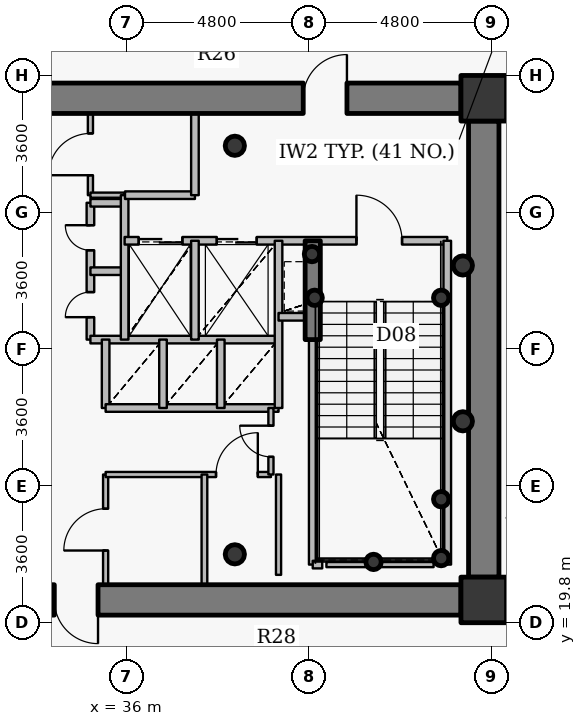
"""IFC4 building model, lengths in metres.
Left out: names, types, materials, properties, quantities, classifications, styles, units other than length and angle.
Written with IfcOpenShell. Run it as: python <this file> out.ifc"""

import sys

from ifc_helpers import new_model, si_unit, direction, frame, frame_2d, origin, origin_2d, place, context, subcontext, project, spatial, rectangle, hollow_circle, extrude, source, transform, mapped, element, fill, save


model = new_model("IFC4")
c1 = context("Model", 3, precision=1e-05, world=origin(), true_north=direction((0.0, 1.0)))
c2 = subcontext(c1, "Body", "Model", "MODEL_VIEW")
j1 = project(units=[si_unit("LENGTHUNIT", "METRE"), si_unit("PLANEANGLEUNIT", "RADIAN")], contexts=[c1])
p1 = place(None, origin())
s1 = spatial("IfcSite", under=j1, at=p1, CompositionType="ELEMENT")
p2 = place(p1, origin())
s2 = spatial("IfcBuilding", under=s1, at=p2, CompositionType="ELEMENT")
p3 = place(p2, frame((0.0, 0.0, 178.65)))
s3 = spatial("IfcBuildingStorey", under=s2, at=p3, CompositionType="ELEMENT", Elevation=178.65)
for number, where, z_axis, x_axis in (
    (1, (45.4, 20.4, 0.0), (0.0, 0.0, 1.0), (1.0, 0.0, 0.0)),
    (2, (45.4, 33.6, 0.0), (0.0, 0.0, 1.0), (1.0, 0.0, 0.0)),
):
    element("IfcColumn", number, at=place(p3, frame(where, z_axis=z_axis, x_axis=x_axis)), inside=s3, PredefinedType="COLUMN", context=c2, shape_type="SweptSolid", body=[
        extrude(rectangle(XDim=1.2, YDim=1.2, at=origin_2d()), origin(), (0.0, 0.0, 1.0), 3.75),
    ])
for number, where, z_axis, x_axis in (
    (3, (38.85, 21.6, 0.0), (0.0, 0.0, 1.0), (1.0, 0.0, 0.0)),
    (4, (38.85, 32.35, 0.0), (0.0, 0.0, 1.0), (1.0, 0.0, 0.0)),
):
    element("IfcColumn", number, at=place(p3, frame(where, z_axis=z_axis, x_axis=x_axis)), inside=s3, PredefinedType="COLUMN", context=c2, shape_type="SweptSolid", body=[
        extrude(hollow_circle(Radius=0.254, WallThickness=0.02, at=origin_2d()), origin(), (0.0, 0.0, 1.0), 3.75),
    ])
for number, where, z_axis, x_axis in (
    (5, (44.28, 21.5, 0.0), (0.0, 0.0, 1.0), (1.0, 0.0, 0.0)),
    (6, (44.28, 23.05, 0.0), (0.0, 0.0, 1.0), (1.0, 0.0, 0.0)),
    (7, (42.5, 21.4, 0.0), (0.0, 0.0, 1.0), (1.0, 0.0, 0.0)),
    (8, (40.95, 28.35, 0.0), (0.0, 0.0, 1.0), (1.0, 0.0, 0.0)),
    (9, (44.28, 28.35, 0.0), (0.0, 0.0, 1.0), (1.0, 0.0, 0.0)),
    (10, (40.88, 29.5, 0.0), (0.0, 0.0, 1.0), (1.0, 0.0, 0.0)),
):
    element("IfcColumn", number, at=place(p3, frame(where, z_axis=z_axis, x_axis=x_axis)), inside=s3, PredefinedType="COLUMN", context=c2, shape_type="SweptSolid", body=[
        extrude(hollow_circle(Radius=0.203, WallThickness=0.016, at=origin_2d()), origin(), (0.0, 0.0, 1.0), 3.75),
    ])
p4 = place(p3, frame((27.2, 33.6, 0.0), z_axis=(0.0, 0.0, 1.0), x_axis=(1.0, 0.0, 0.0)))
e11 = element("IfcWall", 11, at=p4, inside=s3, PredefinedType="SHEAR", context=c2, shape_type="SweptSolid", body=[
    extrude(rectangle(XDim=17.6, YDim=0.8, at=frame_2d((8.8, 0.0))), origin(), (0.0, 0.0, 1.0), 2.95),
])
p5 = place(p4, frame((13.45, 0.0, 0.0)))
e12 = element("IfcOpeningElement", 12, at=p5, cuts=e11, PredefinedType="OPENING", context=c2, shape_type="SweptSolid", body=[
    extrude(rectangle(XDim=1.15, YDim=2.15, at=origin_2d()), frame((0.575, 0.41, 1.075), z_axis=(0.0, -1.0, 0.0), x_axis=(1.0, 0.0, 0.0)), (0.0, 0.0, 1.0), 0.82),
])
p6 = place(p3, frame((45.4, 33.0, 0.0), z_axis=(0.0, 0.0, 1.0), x_axis=(0.0, -1.0, 0.0)))
e13 = element("IfcWall", 13, at=p6, inside=s3, PredefinedType="SHEAR", context=c2, shape_type="SweptSolid", body=[
    extrude(rectangle(XDim=12.0, YDim=0.8, at=frame_2d((6.0, 0.0))), origin(), (0.0, 0.0, 1.0), 2.95),
])
p7 = place(p3, frame((44.8, 20.4, 0.0), z_axis=(0.0, 0.0, 1.0), x_axis=(-1.0, 0.0, 0.0)))
e14 = element("IfcWall", 14, at=p7, inside=s3, PredefinedType="SHEAR", context=c2, shape_type="SweptSolid", body=[
    extrude(rectangle(XDim=17.6, YDim=0.8, at=frame_2d((8.8, 0.0))), origin(), (0.0, 0.0, 1.0), 2.95),
])
p8 = place(p7, frame((9.55, 0.0, 0.0)))
e15 = element("IfcOpeningElement", 15, at=p8, cuts=e14, PredefinedType="OPENING", context=c2, shape_type="SweptSolid", body=[
    extrude(rectangle(XDim=1.15, YDim=2.15, at=origin_2d()), frame((0.575, 0.41, 1.075), z_axis=(0.0, -1.0, 0.0), x_axis=(1.0, 0.0, 0.0)), (0.0, 0.0, 1.0), 0.82),
])
p9 = place(p3, frame((40.9, 27.25, 0.0), z_axis=(0.0, 0.0, 1.0), x_axis=(0.0, 1.0, 0.0)))
e16 = element("IfcWall", 16, at=p9, inside=s3, PredefinedType="SHEAR", context=c2, shape_type="SweptSolid", body=[
    extrude(rectangle(XDim=2.6, YDim=0.4, at=frame_2d((1.3, 0.0))), origin(), (0.0, 0.0, 1.0), 3.1),
])
for number, where, z_axis, x_axis in (
    (17, (44.85, 25.1, 0.0), (0.0, 0.0, 1.0), (1.0, 0.0, 0.0)),
    (18, (44.85, 29.2, 0.0), (0.0, 0.0, 1.0), (1.0, 0.0, 0.0)),
):
    element("IfcColumn", number, at=place(p3, frame(where, z_axis=z_axis, x_axis=x_axis)), inside=s3, PredefinedType="COLUMN", context=c2, shape_type="SweptSolid", body=[
        extrude(hollow_circle(Radius=0.254, WallThickness=0.02, at=origin_2d()), origin(), (0.0, 0.0, 1.0), 3.75),
    ])
p10 = place(p3, frame((35.05, 27.25, 0.0), z_axis=(0.0, 0.0, 1.0), x_axis=(0.0, 1.0, 0.0)))
e19 = element("IfcWall", 19, at=p10, inside=s3, PredefinedType="PARTITIONING", context=c2, shape_type="SweptSolid", body=[
    extrude(rectangle(XDim=3.6, YDim=0.2, at=frame_2d((1.8, 0.0))), origin(), (0.0, 0.0, 1.0), 3.5),
])
p11 = place(p10, frame((0.59, 0.0, 0.0)))
e20 = element("IfcOpeningElement", 20, at=p11, cuts=e19, PredefinedType="OPENING", context=c2, shape_type="SweptSolid", body=[
    extrude(rectangle(XDim=0.66, YDim=2.05, at=origin_2d()), frame((0.33, 0.11, 1.025), z_axis=(0.0, -1.0, 0.0), x_axis=(1.0, 0.0, 0.0)), (0.0, 0.0, 1.0), 0.22),
])
p12 = place(p10, frame((2.35, 0.0, 0.0)))
e21 = element("IfcOpeningElement", 21, at=p12, cuts=e19, PredefinedType="OPENING", context=c2, shape_type="SweptSolid", body=[
    extrude(rectangle(XDim=0.66, YDim=2.05, at=origin_2d()), frame((0.33, 0.11, 1.025), z_axis=(0.0, -1.0, 0.0), x_axis=(1.0, 0.0, 0.0)), (0.0, 0.0, 1.0), 0.22),
])
p13 = place(p3, frame((35.05, 27.25, 0.0), z_axis=(0.0, 0.0, 1.0), x_axis=(1.0, 0.0, 0.0)))
e22 = element("IfcWall", 22, at=p13, inside=s3, PredefinedType="PARTITIONING", context=c2, shape_type="SweptSolid", body=[
    extrude(rectangle(XDim=4.95, YDim=0.2, at=frame_2d((2.475, 0.0))), origin(), (0.0, 0.0, 1.0), 3.085),
])
for number, where, z_axis, x_axis in (
    (23, (35.05, 29.05, 0.0), (0.0, 0.0, 1.0), (1.0, 0.0, 0.0)),
    (24, (35.05, 30.85, 0.0), (0.0, 0.0, 1.0), (1.0, 0.0, 0.0)),
):
    element("IfcWall", number, at=place(p3, frame(where, z_axis=z_axis, x_axis=x_axis)), inside=s3, PredefinedType="PARTITIONING", context=c2, shape_type="SweptSolid", body=[
        extrude(rectangle(XDim=0.9, YDim=0.2, at=frame_2d((0.45, 0.0))), origin(), (0.0, 0.0, 1.0), 3.5),
    ])
p14 = place(p3, frame((35.05, 31.05, 0.0), z_axis=(0.0, 0.0, 1.0), x_axis=(0.0, 1.0, 0.0)))
e25 = element("IfcWall", 25, at=p14, inside=s3, PredefinedType="PARTITIONING", context=c2, shape_type="SweptSolid", body=[
    extrude(rectangle(XDim=2.15, YDim=0.135, at=frame_2d((1.075, 0.0))), origin(), (0.0, 0.0, 1.0), 3.085),
])
p15 = place(p14, frame((0.525, 0.0, 0.0)))
e26 = element("IfcOpeningElement", 26, at=p15, cuts=e25, PredefinedType="OPENING", context=c2, shape_type="SweptSolid", body=[
    extrude(rectangle(XDim=1.1, YDim=2.15, at=origin_2d()), frame((0.55, 0.078, 1.075), z_axis=(0.0, -1.0, 0.0), x_axis=(1.0, 0.0, 0.0)), (0.0, 0.0, 1.0), 0.155),
])
p16 = place(p3, frame((35.05, 31.05, 0.0), z_axis=(0.0, 0.0, 1.0), x_axis=(1.0, 0.0, 0.0)))
e27 = element("IfcWall", 27, at=p16, inside=s3, PredefinedType="PARTITIONING", context=c2, shape_type="SweptSolid", body=[
    extrude(rectangle(XDim=0.9, YDim=0.135, at=frame_2d((0.45, 0.0))), origin(), (0.0, 0.0, 1.0), 3.5),
])
p17 = place(p3, frame((35.45, 20.8, 0.0), z_axis=(0.0, 0.0, 1.0), x_axis=(0.0, 1.0, 0.0)))
e28 = element("IfcWall", 28, at=p17, inside=s3, PredefinedType="PARTITIONING", context=c2, shape_type="SweptSolid", body=[
    extrude(rectangle(XDim=2.9, YDim=0.135, at=frame_2d((1.45, 0.0))), origin(), (0.0, 0.0, 1.0), 3.085),
])
p18 = place(p17, frame((0.9, 0.0, 0.0)))
e29 = element("IfcOpeningElement", 29, at=p18, cuts=e28, PredefinedType="OPENING", context=c2, shape_type="SweptSolid", body=[
    extrude(rectangle(XDim=1.1, YDim=2.15, at=origin_2d()), frame((0.55, 0.078, 1.075), z_axis=(0.0, -1.0, 0.0), x_axis=(1.0, 0.0, 0.0)), (0.0, 0.0, 1.0), 0.155),
])
p19 = place(p3, frame((35.45, 23.7, 0.0), z_axis=(0.0, 0.0, 1.0), x_axis=(1.0, 0.0, 0.0)))
e30 = element("IfcWall", 30, at=p19, inside=s3, PredefinedType="PARTITIONING", context=c2, shape_type="SweptSolid", body=[
    extrude(rectangle(XDim=4.35, YDim=0.135, at=frame_2d((2.175, 0.0))), origin(), (0.0, 0.0, 1.0), 3.085),
])
p20 = place(p19, frame((2.905, 0.0, 0.0)))
e31 = element("IfcOpeningElement", 31, at=p20, cuts=e30, PredefinedType="OPENING", context=c2, shape_type="SweptSolid", body=[
    extrude(rectangle(XDim=1.1, YDim=2.15, at=origin_2d()), frame((0.55, 0.078, 1.075), z_axis=(0.0, -1.0, 0.0), x_axis=(1.0, 0.0, 0.0)), (0.0, 0.0, 1.0), 0.155),
])
p21 = place(p3, frame((35.45, 25.45, 0.0), z_axis=(0.0, 0.0, 1.0), x_axis=(0.0, 1.0, 0.0)))
e32 = element("IfcWall", 32, at=p21, inside=s3, PredefinedType="PARTITIONING", context=c2, shape_type="SweptSolid", body=[
    extrude(rectangle(XDim=1.8, YDim=0.2, at=frame_2d((0.9, 0.0))), origin(), (0.0, 0.0, 1.0), 3.5),
])
p22 = place(p3, frame((35.45, 25.45, 0.0), z_axis=(0.0, 0.0, 1.0), x_axis=(1.0, 0.0, 0.0)))
e33 = element("IfcWall", 33, at=p22, inside=s3, PredefinedType="PARTITIONING", context=c2, shape_type="SweptSolid", body=[
    extrude(rectangle(XDim=4.55, YDim=0.2, at=frame_2d((2.275, 0.0))), origin(), (0.0, 0.0, 1.0), 3.085),
])
p23 = place(p3, frame((35.95, 27.25, 0.0), z_axis=(0.0, 0.0, 1.0), x_axis=(0.0, 1.0, 0.0)))
e34 = element("IfcWall", 34, at=p23, inside=s3, PredefinedType="PARTITIONING", context=c2, shape_type="SweptSolid", body=[
    extrude(rectangle(XDim=3.8, YDim=0.2, at=frame_2d((1.9, 0.0))), origin(), (0.0, 0.0, 1.0), 3.5),
])
p24 = place(p3, frame((35.95, 29.85, 0.0), z_axis=(0.0, 0.0, 1.0), x_axis=(1.0, 0.0, 0.0)))
e35 = element("IfcWall", 35, at=p24, inside=s3, PredefinedType="PARTITIONING", context=c2, shape_type="SweptSolid", body=[
    extrude(rectangle(XDim=8.49, YDim=0.2, at=frame_2d((4.245, 0.0))), origin(), (0.0, 0.0, 1.0), 3.085),
])
p25 = place(p24, frame((6.1, 0.0, 0.0)))
e36 = element("IfcOpeningElement", 36, at=p25, cuts=e35, PredefinedType="OPENING", context=c2, shape_type="SweptSolid", body=[
    extrude(rectangle(XDim=1.2, YDim=2.15, at=origin_2d()), frame((0.6, 0.11, 1.075), z_axis=(0.0, -1.0, 0.0), x_axis=(1.0, 0.0, 0.0)), (0.0, 0.0, 1.0), 0.22),
])
p26 = place(p24, frame((0.37, 0.0, 0.0)))
e37 = element("IfcOpeningElement", 37, at=p26, cuts=e35, PredefinedType="OPENING", context=c2, shape_type="SweptSolid", body=[
    extrude(rectangle(XDim=1.15, YDim=2.15, at=origin_2d()), frame((0.575, 0.11, 1.075), z_axis=(0.0, -1.0, 0.0), x_axis=(1.0, 0.0, 0.0)), (0.0, 0.0, 1.0), 0.22),
])
p27 = place(p24, frame((2.425, 0.0, 0.0)))
e38 = element("IfcOpeningElement", 38, at=p27, cuts=e35, PredefinedType="OPENING", context=c2, shape_type="SweptSolid", body=[
    extrude(rectangle(XDim=1.05, YDim=2.15, at=origin_2d()), frame((0.525, 0.11, 1.075), z_axis=(0.0, -1.0, 0.0), x_axis=(1.0, 0.0, 0.0)), (0.0, 0.0, 1.0), 0.22),
])
p28 = place(p3, frame((35.96, 31.05, 0.0), z_axis=(0.0, 0.0, 1.0), x_axis=(1.0, 0.0, 0.0)))
e39 = element("IfcWall", 39, at=p28, inside=s3, PredefinedType="PARTITIONING", context=c2, shape_type="SweptSolid", body=[
    extrude(rectangle(XDim=1.84, YDim=0.2, at=frame_2d((0.92, 0.0))), origin(), (0.0, 0.0, 1.0), 3.5),
])
p29 = place(p3, frame((36.96, 25.45, 0.0), z_axis=(0.0, 0.0, 1.0), x_axis=(0.0, 1.0, 0.0)))
e40 = element("IfcWall", 40, at=p29, inside=s3, PredefinedType="PARTITIONING", context=c2, shape_type="SweptSolid", body=[
    extrude(rectangle(XDim=1.8, YDim=0.2, at=frame_2d((0.9, 0.0))), origin(), (0.0, 0.0, 1.0), 3.5),
])
p30 = place(p3, frame((37.8, 27.25, 0.0), z_axis=(0.0, 0.0, 1.0), x_axis=(0.0, 1.0, 0.0)))
e41 = element("IfcWall", 41, at=p30, inside=s3, PredefinedType="PARTITIONING", context=c2, shape_type="SweptSolid", body=[
    extrude(rectangle(XDim=2.6, YDim=0.2, at=frame_2d((1.3, 0.0))), origin(), (0.0, 0.0, 1.0), 3.5),
])
p31 = place(p3, frame((37.8, 31.05, 0.0), z_axis=(0.0, 0.0, 1.0), x_axis=(0.0, 1.0, 0.0)))
e42 = element("IfcWall", 42, at=p31, inside=s3, PredefinedType="PARTITIONING", context=c2, shape_type="SweptSolid", body=[
    extrude(rectangle(XDim=2.15, YDim=0.2, at=frame_2d((1.075, 0.0))), origin(), (0.0, 0.0, 1.0), 3.085),
])
p32 = place(p3, frame((38.05, 20.18, 0.0), z_axis=(0.0, 0.0, 1.0), x_axis=(0.0, 1.0, 0.0)))
e43 = element("IfcWall", 43, at=p32, inside=s3, PredefinedType="PARTITIONING", context=c2, shape_type="SweptSolid", body=[
    extrude(rectangle(XDim=3.52, YDim=0.15, at=frame_2d((1.76, 0.0))), origin(), (0.0, 0.0, 1.0), 2.935),
])
p33 = place(p3, frame((38.48, 25.45, 0.0), z_axis=(0.0, 0.0, 1.0), x_axis=(0.0, 1.0, 0.0)))
e44 = element("IfcWall", 44, at=p33, inside=s3, PredefinedType="PARTITIONING", context=c2, shape_type="SweptSolid", body=[
    extrude(rectangle(XDim=1.8, YDim=0.2, at=frame_2d((0.9, 0.0))), origin(), (0.0, 0.0, 1.0), 3.5),
])
p34 = place(p3, frame((39.8, 23.7, 0.0), z_axis=(0.0, 0.0, 1.0), x_axis=(0.0, 1.0, 0.0)))
e45 = element("IfcWall", 45, at=p34, inside=s3, PredefinedType="PARTITIONING", context=c2, shape_type="SweptSolid", body=[
    extrude(rectangle(XDim=1.75, YDim=0.135, at=frame_2d((0.875, 0.0))), origin(), (0.0, 0.0, 1.0), 3.5),
])
p35 = place(p34, frame((0.465, 0.0, 0.0)))
e46 = element("IfcOpeningElement", 46, at=p35, cuts=e45, PredefinedType="OPENING", context=c2, shape_type="SweptSolid", body=[
    extrude(rectangle(XDim=0.82, YDim=2.1, at=origin_2d()), frame((0.41, 0.078, 1.05), z_axis=(0.0, -1.0, 0.0), x_axis=(1.0, 0.0, 0.0)), (0.0, 0.0, 1.0), 0.155),
])
p36 = place(p3, frame((40.0, 25.45, 0.0), z_axis=(0.0, 0.0, 1.0), x_axis=(0.0, 1.0, 0.0)))
e47 = element("IfcWall", 47, at=p36, inside=s3, PredefinedType="PARTITIONING", context=c2, shape_type="SweptSolid", body=[
    extrude(rectangle(XDim=4.4, YDim=0.2, at=frame_2d((2.2, 0.0))), origin(), (0.0, 0.0, 1.0), 3.5),
])
p37 = place(p3, frame((40.0, 27.85, 0.0), z_axis=(0.0, 0.0, 1.0), x_axis=(1.0, 0.0, 0.0)))
e48 = element("IfcWall", 48, at=p37, inside=s3, PredefinedType="PARTITIONING", context=c2, shape_type="SweptSolid", body=[
    extrude(rectangle(XDim=0.9, YDim=0.2, at=frame_2d((0.45, 0.0))), origin(), (0.0, 0.0, 1.0), 3.5),
])
p38 = place(p3, frame((40.9, 21.33, 0.0), z_axis=(0.0, 0.0, 1.0), x_axis=(0.0, 1.0, 0.0)))
e49 = element("IfcWall", 49, at=p38, inside=s3, PredefinedType="PARTITIONING", context=c2, shape_type="SweptSolid", body=[
    extrude(rectangle(XDim=5.91, YDim=0.2, at=frame_2d((2.955, 0.0))), origin(), (0.0, 0.0, 1.0), 3.035),
])
p39 = place(p3, frame((40.9, 21.33, 0.0), z_axis=(0.0, 0.0, 1.0), x_axis=(1.0, 0.0, 0.0)))
e50 = element("IfcWall", 50, at=p39, inside=s3, PredefinedType="PARTITIONING", context=c2, shape_type="SweptSolid", body=[
    extrude(rectangle(XDim=0.25, YDim=0.2, at=frame_2d((0.125, 0.0))), origin(), (0.0, 0.0, 1.0), 3.035),
])
p40 = place(p3, frame((44.44, 21.33, 0.0), z_axis=(0.0, 0.0, 1.0), x_axis=(0.0, 1.0, 0.0)))
e51 = element("IfcWall", 51, at=p40, inside=s3, PredefinedType="PARTITIONING", context=c2, shape_type="SweptSolid", body=[
    extrude(rectangle(XDim=8.52, YDim=0.2, at=frame_2d((4.26, 0.0))), origin(), (0.0, 0.0, 1.0), 3.5),
])
p41 = place(p3, frame((45.8, 20.05, 0.0), z_axis=(0.0, 0.0, 1.0), x_axis=(1.0, 0.0, 0.0)))
e52 = element("IfcWall", 52, at=p41, inside=s3, PredefinedType="PARTITIONING", context=c2, shape_type="SweptSolid", body=[
    extrude(rectangle(XDim=2.4, YDim=0.135, at=frame_2d((1.2, 0.0))), origin(), (0.0, 0.0, 1.0), 3.5),
])
p42 = place(p3, frame((44.08, 21.33, 0.0), z_axis=(0.0, 0.0, 1.0), x_axis=(-1.0, 0.0, 0.0)))
e53 = element("IfcWall", 53, at=p42, inside=s3, PredefinedType="PARTITIONING", context=c2, shape_type="SweptSolid", body=[
    extrude(rectangle(XDim=2.82, YDim=0.135, at=frame_2d((1.41, 0.0))), origin(), (0.0, 0.0, 1.0), 3.035),
])
p43 = place(p3, frame((40.0, 23.7, 0.0), z_axis=(0.0, 0.0, 1.0), x_axis=(0.0, -1.0, 0.0)))
e54 = element("IfcWall", 54, at=p43, inside=s3, PredefinedType="PARTITIONING", context=c2, shape_type="SweptSolid", body=[
    extrude(rectangle(XDim=2.64, YDim=0.135, at=frame_2d((1.32, 0.0))), origin(), (0.0, 0.0, 1.0), 3.035),
])
p44 = place(p3, frame((49.061, 33.95, 0.0), z_axis=(0.0, 0.0, 1.0), x_axis=(-1.0, 0.0, 0.0)))
e55 = element("IfcWall", 55, at=p44, inside=s3, PredefinedType="PARTITIONING", context=c2, shape_type="SweptSolid", body=[
    extrude(rectangle(XDim=3.261, YDim=0.135, at=frame_2d((1.63, 0.0))), origin(), (0.0, 0.0, 1.0), 3.5),
])
for number, where, z_axis, x_axis in (
    (56, (45.79, 34.0, 0.0), (0.0, 0.0, 1.0), (-1.0, 0.0, 0.0)),
    (57, (44.81, 20.0, 0.0), (0.0, 0.0, 1.0), (1.0, 0.0, 0.0)),
):
    element("IfcWall", number, at=place(p3, frame(where, z_axis=z_axis, x_axis=x_axis)), inside=s3, PredefinedType="PARTITIONING", context=c2, shape_type="SweptSolid", body=[
        extrude(rectangle(XDim=0.98, YDim=0.135, at=frame_2d((0.49, 0.0))), origin(), (0.0, 0.0, 1.0), 2.935),
    ])
p45 = place(p3, frame((45.8, 20.377, 0.0), z_axis=(0.0, 0.0, 1.0), x_axis=(0.0, 1.0, 0.0)))
e58 = element("IfcWall", 58, at=p45, inside=s3, PredefinedType="PARTITIONING", context=c2, shape_type="SweptSolid", body=[
    extrude(rectangle(XDim=0.613, YDim=0.135, at=frame_2d((0.306, 0.0))), origin(), (0.0, 0.0, 1.0), 3.5),
])
m1 = source(origin(), c2, "Body", "SweptSolid", [
    extrude(rectangle(XDim=1.15, YDim=2.15, at=origin_2d()), frame((0.575, 0.025, 1.075), z_axis=(0.0, -1.0, 0.0), x_axis=(1.0, 0.0, 0.0)), (0.0, 0.0, 1.0), 0.05),
])
p46 = place(p5, origin())
e59 = element("IfcDoor", 59, at=p46, inside=s3, OperationType="SINGLE_SWING_RIGHT", PredefinedType="DOOR", context=c2, shape_type="MappedRepresentation", body=[
    mapped(m1, transform((0.0, 0.0, 0.0), x_axis=(1.0, 0.0, 0.0), y_axis=(0.0, 1.0, 0.0), z_axis=(0.0, 0.0, 1.0), scale=1.0)),
])
fill(e12, e59)
p47 = place(p8, origin())
e60 = element("IfcDoor", 60, at=p47, inside=s3, OperationType="SINGLE_SWING_LEFT", PredefinedType="DOOR", context=c2, shape_type="MappedRepresentation", body=[
    mapped(m1, transform((0.0, 0.0, 0.0), x_axis=(1.0, 0.0, 0.0), y_axis=(0.0, 1.0, 0.0), z_axis=(0.0, 0.0, 1.0), scale=1.0)),
])
fill(e15, e60)
m2 = source(origin(), c2, "Body", "SweptSolid", [
    extrude(rectangle(XDim=1.2, YDim=2.15, at=origin_2d()), frame((0.6, 0.025, 1.075), z_axis=(0.0, -1.0, 0.0), x_axis=(1.0, 0.0, 0.0)), (0.0, 0.0, 1.0), 0.05),
])
p48 = place(p25, origin())
e61 = element("IfcDoor", 61, at=p48, inside=s3, OperationType="SINGLE_SWING_LEFT", PredefinedType="DOOR", context=c2, shape_type="MappedRepresentation", body=[
    mapped(m2, transform((0.0, 0.0, 0.0), x_axis=(1.0, 0.0, 0.0), y_axis=(0.0, 1.0, 0.0), z_axis=(0.0, 0.0, 1.0), scale=1.0)),
])
fill(e36, e61)
m3 = source(origin(), c2, "Body", "SweptSolid", [
    extrude(rectangle(XDim=1.15, YDim=2.15, at=origin_2d()), frame((0.575, 0.025, 1.075), z_axis=(0.0, -1.0, 0.0), x_axis=(1.0, 0.0, 0.0)), (0.0, 0.0, 1.0), 0.05),
])
p49 = place(p26, origin())
e62 = element("IfcDoor", 62, at=p49, inside=s3, OperationType="DOUBLE_DOOR_SLIDING", PredefinedType="USERDEFINED", context=c2, shape_type="MappedRepresentation", body=[
    mapped(m3, transform((0.0, 0.0, 0.0), x_axis=(1.0, 0.0, 0.0), y_axis=(0.0, 1.0, 0.0), z_axis=(0.0, 0.0, 1.0), scale=1.0)),
])
fill(e37, e62)
m4 = source(origin(), c2, "Body", "SweptSolid", [
    extrude(rectangle(XDim=1.05, YDim=2.15, at=origin_2d()), frame((0.525, 0.025, 1.075), z_axis=(0.0, -1.0, 0.0), x_axis=(1.0, 0.0, 0.0)), (0.0, 0.0, 1.0), 0.05),
])
p50 = place(p27, origin())
e63 = element("IfcDoor", 63, at=p50, inside=s3, OperationType="DOUBLE_DOOR_SLIDING", PredefinedType="USERDEFINED", context=c2, shape_type="MappedRepresentation", body=[
    mapped(m4, transform((0.0, 0.0, 0.0), x_axis=(1.0, 0.0, 0.0), y_axis=(0.0, 1.0, 0.0), z_axis=(0.0, 0.0, 1.0), scale=1.0)),
])
fill(e38, e63)
m5 = source(origin(), c2, "Body", "SweptSolid", [
    extrude(rectangle(XDim=0.66, YDim=2.05, at=origin_2d()), frame((0.33, 0.025, 1.025), z_axis=(0.0, -1.0, 0.0), x_axis=(1.0, 0.0, 0.0)), (0.0, 0.0, 1.0), 0.05),
])
p51 = place(p11, origin())
e64 = element("IfcDoor", 64, at=p51, inside=s3, OperationType="SINGLE_SWING_LEFT", PredefinedType="USERDEFINED", context=c2, shape_type="MappedRepresentation", body=[
    mapped(m5, transform((0.0, 0.0, 0.0), x_axis=(1.0, 0.0, 0.0), y_axis=(0.0, 1.0, 0.0), z_axis=(0.0, 0.0, 1.0), scale=1.0)),
])
fill(e20, e64)
p52 = place(p12, origin())
e65 = element("IfcDoor", 65, at=p52, inside=s3, OperationType="SINGLE_SWING_RIGHT", PredefinedType="USERDEFINED", context=c2, shape_type="MappedRepresentation", body=[
    mapped(m5, transform((0.0, 0.0, 0.0), x_axis=(1.0, 0.0, 0.0), y_axis=(0.0, 1.0, 0.0), z_axis=(0.0, 0.0, 1.0), scale=1.0)),
])
fill(e21, e65)
m6 = source(origin(), c2, "Body", "SweptSolid", [
    extrude(rectangle(XDim=1.1, YDim=2.15, at=origin_2d()), frame((0.55, 0.025, 1.075), z_axis=(0.0, -1.0, 0.0), x_axis=(1.0, 0.0, 0.0)), (0.0, 0.0, 1.0), 0.05),
])
p53 = place(p18, origin())
e66 = element("IfcDoor", 66, at=p53, inside=s3, OperationType="SINGLE_SWING_LEFT", PredefinedType="DOOR", context=c2, shape_type="MappedRepresentation", body=[
    mapped(m6, transform((0.0, 0.0, 0.0), x_axis=(1.0, 0.0, 0.0), y_axis=(0.0, 1.0, 0.0), z_axis=(0.0, 0.0, 1.0), scale=1.0)),
])
fill(e29, e66)
p54 = place(p20, origin())
e67 = element("IfcDoor", 67, at=p54, inside=s3, OperationType="SINGLE_SWING_RIGHT", PredefinedType="DOOR", context=c2, shape_type="MappedRepresentation", body=[
    mapped(m6, transform((0.0, 0.0, 0.0), x_axis=(1.0, 0.0, 0.0), y_axis=(0.0, 1.0, 0.0), z_axis=(0.0, 0.0, 1.0), scale=1.0)),
])
fill(e31, e67)
p55 = place(p15, origin())
e68 = element("IfcDoor", 68, at=p55, inside=s3, OperationType="SINGLE_SWING_LEFT", PredefinedType="DOOR", context=c2, shape_type="MappedRepresentation", body=[
    mapped(m6, transform((0.0, 0.0, 0.0), x_axis=(1.0, 0.0, 0.0), y_axis=(0.0, 1.0, 0.0), z_axis=(0.0, 0.0, 1.0), scale=1.0)),
])
fill(e26, e68)
m7 = source(origin(), c2, "Body", "SweptSolid", [
    extrude(rectangle(XDim=0.82, YDim=2.1, at=origin_2d()), frame((0.41, 0.025, 1.05), z_axis=(0.0, -1.0, 0.0), x_axis=(1.0, 0.0, 0.0)), (0.0, 0.0, 1.0), 0.05),
])
p56 = place(p35, origin())
e69 = element("IfcDoor", 69, at=p56, inside=s3, OperationType="SINGLE_SWING_RIGHT", PredefinedType="DOOR", context=c2, shape_type="MappedRepresentation", body=[
    mapped(m7, transform((0.0, 0.0, 0.0), x_axis=(1.0, 0.0, 0.0), y_axis=(0.0, 1.0, 0.0), z_axis=(0.0, 0.0, 1.0), scale=1.0)),
])
fill(e46, e69)
save(model, sys.argv[1])
